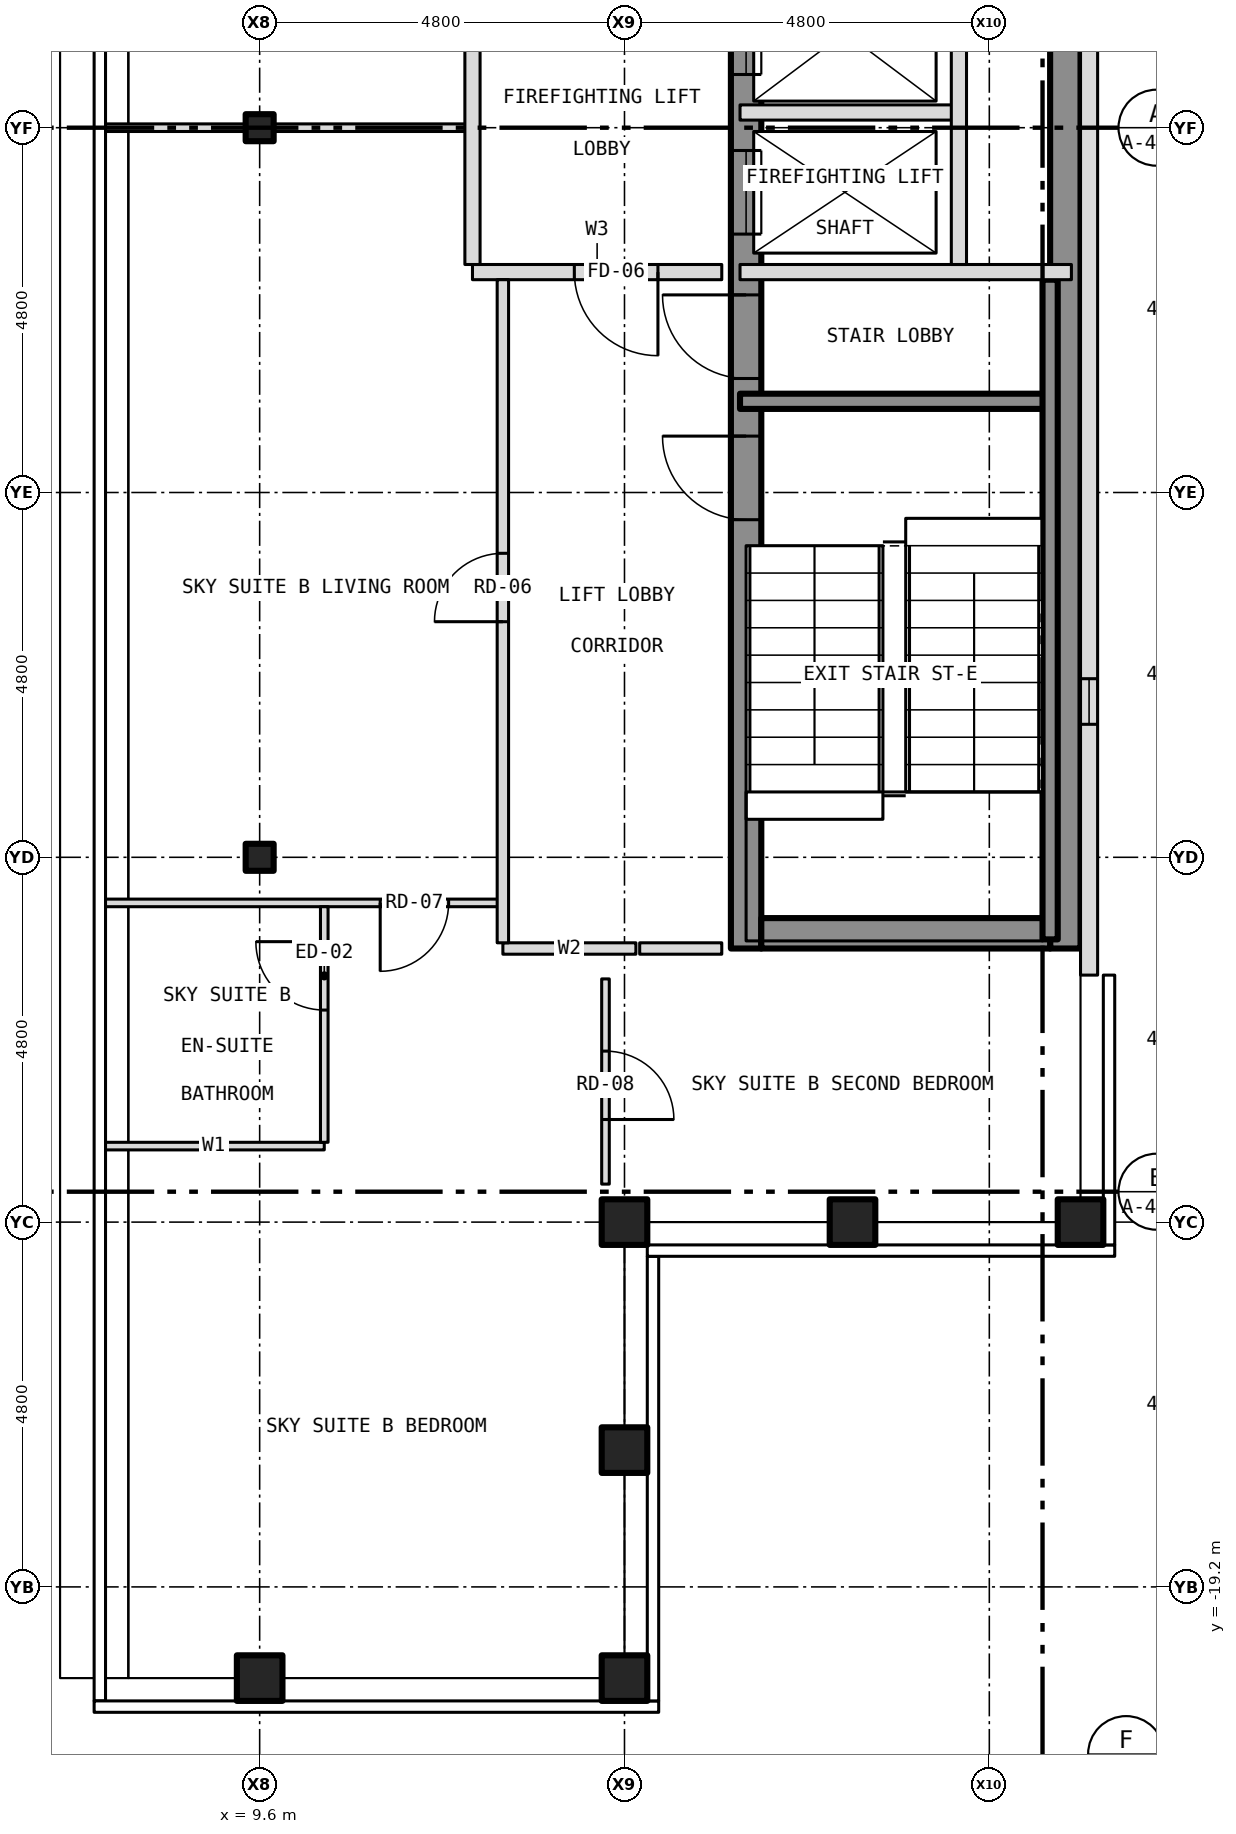
"""IFC4 building model, lengths in metres.
Left out: names, types, materials, properties, quantities, classifications, styles, units other than length and angle.
Written with IfcOpenShell. Run it as: python <this file> out.ifc"""

import sys

from ifc_helpers import new_model, si_unit, direction, frame, frame_2d, origin, origin_2d, place, context, subcontext, project, spatial, rectangle, hollow_rectangle, i_section, extrude, element, fill, save


model = new_model("IFC4")
c1 = context("Model", 3, precision=1e-05, world=origin(), true_north=direction((0.0, 1.0)))
c2 = subcontext(c1, "Body", "Model", "MODEL_VIEW")
j1 = project(units=[si_unit("LENGTHUNIT", "METRE"), si_unit("PLANEANGLEUNIT", "RADIAN")], contexts=[c1])
p1 = place(None, origin())
s1 = spatial("IfcSite", under=j1, at=p1, CompositionType="ELEMENT")
p2 = place(p1, origin())
s2 = spatial("IfcBuilding", under=s1, at=p2, CompositionType="ELEMENT")
p3 = place(p2, frame((0.0, 0.0, 269.0)))
s3 = spatial("IfcBuildingStorey", under=s2, at=p3, CompositionType="ELEMENT", Elevation=269.0)
for number, where, z_axis, x_axis in (
    (1, (9.6, -20.4, -0.15), (0.0, 0.0, 1.0), (1.0, 0.0, 0.0)),
    (2, (14.4, -20.4, -0.15), (0.0, 0.0, 1.0), (1.0, 0.0, 0.0)),
    (3, (20.4, -14.4, -0.15), (0.0, 0.0, 1.0), (1.0, 0.0, 0.0)),
    (4, (14.4, -14.4, -0.15), (0.0, 0.0, 1.0), (1.0, 0.0, 0.0)),
    (5, (14.4, -17.4, -0.15), (0.0, 0.0, 1.0), (1.0, 0.0, 0.0)),
    (6, (17.4, -14.4, -0.15), (0.0, 0.0, 1.0), (1.0, 0.0, 0.0)),
):
    element("IfcColumn", number, at=place(p3, frame(where, z_axis=z_axis, x_axis=x_axis)), inside=s3, PredefinedType="COLUMN", context=c2, shape_type="SweptSolid", body=[
        extrude(hollow_rectangle(XDim=0.6, YDim=0.6, WallThickness=0.03, at=origin_2d()), origin(), (0.0, 0.0, 1.0), 3.5),
    ])
for number, where, z_axis, x_axis in (
    (7, (9.6, -9.6, -0.15), (0.0, 0.0, 1.0), (1.0, 0.0, 0.0)),
    (8, (9.6, 0.0, -0.15), (0.0, 0.0, 1.0), (1.0, 0.0, 0.0)),
):
    element("IfcColumn", number, at=place(p3, frame(where, z_axis=z_axis, x_axis=x_axis)), inside=s3, PredefinedType="COLUMN", context=c2, shape_type="SweptSolid", body=[
        extrude(i_section(OverallWidth=0.368, OverallDepth=0.356, WebThickness=0.011, FlangeThickness=0.018, at=origin_2d()), origin(), (0.0, 0.0, 1.0), 3.5),
    ])
p4 = place(p3, frame((16.0, -10.8, 0.0), z_axis=(0.0, 0.0, 1.0), x_axis=(0.0, 1.0, 0.0)))
e9 = element("IfcWall", 9, at=p4, inside=s3, PredefinedType="SHEAR", context=c2, shape_type="SweptSolid", body=[
    extrude(rectangle(XDim=21.6, YDim=0.4, at=frame_2d((10.8, 0.0))), origin(), (0.0, 0.0, 1.0), 3.25),
])
p5 = place(p4, frame((9.4, 0.0, 0.0)))
e10 = element("IfcOpeningElement", 10, at=p5, cuts=e9, PredefinedType="OPENING", context=c2, shape_type="SweptSolid", body=[
    extrude(rectangle(XDim=1.1, YDim=2.1, at=frame_2d((0.55, 1.05))), frame((0.0, 0.212, 0.0), z_axis=(0.0, -1.0, 0.0), x_axis=(1.0, 0.0, 0.0)), (0.0, 0.0, 1.0), 0.424),
])
p6 = place(p4, frame((11.5, 0.0, 0.0)))
e11 = element("IfcOpeningElement", 11, at=p6, cuts=e9, PredefinedType="OPENING", context=c2, shape_type="SweptSolid", body=[
    extrude(rectangle(XDim=1.1, YDim=2.1, at=frame_2d((0.55, 1.05))), frame((0.0, 0.212, 0.0), z_axis=(0.0, -1.0, 0.0), x_axis=(1.0, 0.0, 0.0)), (0.0, 0.0, 1.0), 0.424),
])
p7 = place(p4, frame((13.6, 0.0, 0.0)))
e12 = element("IfcOpeningElement", 12, at=p7, cuts=e9, PredefinedType="OPENING", context=c2, shape_type="SweptSolid", body=[
    extrude(rectangle(XDim=1.1, YDim=2.1, at=frame_2d((0.55, 1.05))), frame((0.0, 0.212, 0.0), z_axis=(0.0, -1.0, 0.0), x_axis=(1.0, 0.0, 0.0)), (0.0, 0.0, 1.0), 0.424),
])
p8 = place(p4, frame((15.7, 0.0, 0.0)))
e13 = element("IfcOpeningElement", 13, at=p8, cuts=e9, PredefinedType="OPENING", context=c2, shape_type="SweptSolid", body=[
    extrude(rectangle(XDim=1.1, YDim=2.1, at=frame_2d((0.55, 1.05))), frame((0.0, 0.212, 0.0), z_axis=(0.0, -1.0, 0.0), x_axis=(1.0, 0.0, 0.0)), (0.0, 0.0, 1.0), 0.424),
])
p9 = place(p4, frame((17.8, 0.0, 0.0)))
e14 = element("IfcOpeningElement", 14, at=p9, cuts=e9, PredefinedType="OPENING", context=c2, shape_type="SweptSolid", body=[
    extrude(rectangle(XDim=1.1, YDim=2.1, at=frame_2d((0.55, 1.05))), frame((0.0, 0.212, 0.0), z_axis=(0.0, -1.0, 0.0), x_axis=(1.0, 0.0, 0.0)), (0.0, 0.0, 1.0), 0.424),
])
p10 = place(p4, frame((5.642, 0.0, 0.0)))
e15 = element("IfcOpeningElement", 15, at=p10, cuts=e9, PredefinedType="OPENING", context=c2, shape_type="SweptSolid", body=[
    extrude(rectangle(XDim=1.1, YDim=2.1, at=frame_2d((0.55, 1.05))), frame((0.0, 0.212, 0.0), z_axis=(0.0, -1.0, 0.0), x_axis=(1.0, 0.0, 0.0)), (0.0, 0.0, 1.0), 0.424),
])
p11 = place(p4, frame((7.5, 0.0, 0.0)))
e16 = element("IfcOpeningElement", 16, at=p11, cuts=e9, PredefinedType="OPENING", context=c2, shape_type="SweptSolid", body=[
    extrude(rectangle(XDim=1.1, YDim=2.1, at=frame_2d((0.55, 1.05))), frame((0.0, 0.212, 0.0), z_axis=(0.0, -1.0, 0.0), x_axis=(1.0, 0.0, 0.0)), (0.0, 0.0, 1.0), 0.424),
])
p12 = place(p4, frame((20.0, 0.0, 0.0)))
e17 = element("IfcOpeningElement", 17, at=p12, cuts=e9, PredefinedType="OPENING", context=c2, shape_type="SweptSolid", body=[
    extrude(rectangle(XDim=0.9, YDim=2.1, at=frame_2d((0.45, 1.05))), frame((0.0, 0.212, 0.0), z_axis=(0.0, -1.0, 0.0), x_axis=(1.0, 0.0, 0.0)), (0.0, 0.0, 1.0), 0.424),
])
p13 = place(p3, frame((20.2, -10.8, 0.0), z_axis=(0.0, 0.0, 1.0), x_axis=(0.0, 1.0, 0.0)))
e18 = element("IfcWall", 18, at=p13, inside=s3, PredefinedType="SHEAR", context=c2, shape_type="SweptSolid", body=[
    extrude(rectangle(XDim=21.6, YDim=0.4, at=frame_2d((10.8, 0.0))), origin(), (0.0, 0.0, 1.0), 3.25),
])
p14 = place(p3, frame((16.2, -10.6, 0.0), z_axis=(0.0, 0.0, 1.0), x_axis=(1.0, 0.0, 0.0)))
e19 = element("IfcWall", 19, at=p14, inside=s3, PredefinedType="SHEAR", context=c2, shape_type="SweptSolid", body=[
    extrude(rectangle(XDim=3.8, YDim=0.4, at=frame_2d((1.9, 0.0))), origin(), (0.0, 0.0, 1.0), 3.25),
])
p15 = place(p3, frame((20.512, -11.15, 0.0), z_axis=(0.0, 0.0, 1.0), x_axis=(0.0, 1.0, 0.0)))
e20 = element("IfcWall", 20, at=p15, inside=s3, PredefinedType="SOLIDWALL", context=c2, shape_type="SweptSolid", body=[
    extrude(rectangle(XDim=22.3, YDim=0.225, at=frame_2d((11.15, 0.0))), origin(), (0.0, 0.0, 1.0), 3.5),
])
p16 = place(p15, frame((3.3, 0.0, 1.0)))
e21 = element("IfcOpeningElement", 21, at=p16, cuts=e20, PredefinedType="OPENING", context=c2, shape_type="SweptSolid", body=[
    extrude(rectangle(XDim=0.6, YDim=1.5, at=frame_2d((0.3, 0.75))), frame((0.0, 0.125, 0.0), z_axis=(0.0, -1.0, 0.0), x_axis=(1.0, 0.0, 0.0)), (0.0, 0.0, 1.0), 0.249),
])
p17 = place(p3, frame((7.542, -13.4, 0.0), z_axis=(0.0, 0.0, 1.0), x_axis=(1.0, 0.0, 0.0)))
e22 = element("IfcWall", 22, at=p17, inside=s3, PredefinedType="PARTITIONING", context=c2, shape_type="SweptSolid", body=[
    extrude(rectangle(XDim=2.908, YDim=0.1, at=frame_2d((1.454, 0.0))), origin(), (0.0, 0.0, 1.0), 3.35),
])
p18 = place(p3, frame((12.8, -10.8, 0.0), z_axis=(0.0, 0.0, 1.0), x_axis=(1.0, 0.0, 0.0)))
e23 = element("IfcWall", 23, at=p18, inside=s3, PredefinedType="PARTITIONING", context=c2, shape_type="SweptSolid", body=[
    extrude(rectangle(XDim=1.75, YDim=0.15, at=frame_2d((0.875, 0.0))), origin(), (0.0, 0.0, 1.0), 3.35),
])
p19 = place(p3, frame((14.6, -10.8, 0.0), z_axis=(0.0, 0.0, 1.0), x_axis=(1.0, 0.0, 0.0)))
e24 = element("IfcWall", 24, at=p19, inside=s3, PredefinedType="PARTITIONING", context=c2, shape_type="SweptSolid", body=[
    extrude(rectangle(XDim=1.08, YDim=0.15, at=frame_2d((0.54, 0.0))), origin(), (0.0, 0.0, 1.0), 3.35),
])
p20 = place(p3, frame((7.542, -10.2, 0.0), z_axis=(0.0, 0.0, 1.0), x_axis=(1.0, 0.0, 0.0)))
e25 = element("IfcWall", 25, at=p20, inside=s3, PredefinedType="PARTITIONING", context=c2, shape_type="SweptSolid", body=[
    extrude(rectangle(XDim=5.258, YDim=0.1, at=frame_2d((2.629, 0.0))), origin(), (0.0, 0.0, 1.0), 3.35),
])
p21 = place(p20, frame((3.644, 0.0, 0.0)))
e26 = element("IfcOpeningElement", 26, at=p21, cuts=e25, PredefinedType="OPENING", context=c2, shape_type="SweptSolid", body=[
    extrude(rectangle(XDim=0.9, YDim=2.1, at=frame_2d((0.45, 1.05))), frame((0.0, 0.062, 0.0), z_axis=(0.0, -1.0, 0.0), x_axis=(1.0, 0.0, 0.0)), (0.0, 0.0, 1.0), 0.124),
])
p22 = place(p3, frame((15.92, -3.6, 0.0), z_axis=(0.0, 0.0, 1.0), x_axis=(1.0, 0.0, 0.0)))
e27 = element("IfcWall", 27, at=p22, inside=s3, PredefinedType="SHEAR", context=c2, shape_type="SweptSolid", body=[
    extrude(rectangle(XDim=4.08, YDim=0.2, at=frame_2d((2.04, 0.0))), origin(), (0.0, 0.0, 1.0), 3.25),
])
p23 = place(p3, frame((12.4, -1.9, 0.0), z_axis=(0.0, 0.0, 1.0), x_axis=(1.0, 0.0, 0.0)))
e28 = element("IfcWall", 28, at=p23, inside=s3, PredefinedType="PARTITIONING", context=c2, shape_type="SweptSolid", body=[
    extrude(rectangle(XDim=3.28, YDim=0.2, at=frame_2d((1.64, 0.0))), origin(), (0.0, 0.0, 1.0), 3.35),
])
p24 = place(p23, frame((1.34, 0.0, 0.0)))
e29 = element("IfcOpeningElement", 29, at=p24, cuts=e28, PredefinedType="OPENING", context=c2, shape_type="SweptSolid", body=[
    extrude(rectangle(XDim=1.1, YDim=2.1, at=frame_2d((0.55, 1.05))), frame((0.0, 0.112, 0.0), z_axis=(0.0, -1.0, 0.0), x_axis=(1.0, 0.0, 0.0)), (0.0, 0.0, 1.0), 0.224),
])
p25 = place(p3, frame((15.92, -1.9, 0.0), z_axis=(0.0, 0.0, 1.0), x_axis=(1.0, 0.0, 0.0)))
e30 = element("IfcWall", 30, at=p25, inside=s3, PredefinedType="PARTITIONING", context=c2, shape_type="SweptSolid", body=[
    extrude(rectangle(XDim=4.36, YDim=0.2, at=frame_2d((2.18, 0.0))), origin(), (0.0, 0.0, 1.0), 3.25),
])
p26 = place(p3, frame((7.542, 0.0, 0.0), z_axis=(0.0, 0.0, 1.0), x_axis=(1.0, 0.0, 0.0)))
e31 = element("IfcWall", 31, at=p26, inside=s3, PredefinedType="PARTITIONING", context=c2, shape_type="SweptSolid", body=[
    extrude(rectangle(XDim=1.874, YDim=0.1, at=frame_2d((0.937, 0.0))), origin(), (0.0, 0.0, 1.0), 2.728),
])
p27 = place(p3, frame((9.416, 0.0, 0.0), z_axis=(0.0, 0.0, 1.0), x_axis=(1.0, 0.0, 0.0)))
e32 = element("IfcWall", 32, at=p27, inside=s3, PredefinedType="PARTITIONING", context=c2, shape_type="SweptSolid", body=[
    extrude(rectangle(XDim=0.368, YDim=0.1, at=frame_2d((0.184, 0.0))), origin(), (0.0, 0.0, 1.0), 3.35),
])
p28 = place(p3, frame((9.784, 0.0, 0.0), z_axis=(0.0, 0.0, 1.0), x_axis=(1.0, 0.0, 0.0)))
e33 = element("IfcWall", 33, at=p28, inside=s3, PredefinedType="PARTITIONING", context=c2, shape_type="SweptSolid", body=[
    extrude(rectangle(XDim=2.616, YDim=0.1, at=frame_2d((1.308, 0.0))), origin(), (0.0, 0.0, 1.0), 2.728),
])
p29 = place(p3, frame((15.92, 0.2, 0.0), z_axis=(0.0, 0.0, 1.0), x_axis=(1.0, 0.0, 0.0)))
e34 = element("IfcWall", 34, at=p29, inside=s3, PredefinedType="PARTITIONING", context=c2, shape_type="SweptSolid", body=[
    extrude(rectangle(XDim=2.88, YDim=0.2, at=frame_2d((1.44, 0.0))), origin(), (0.0, 0.0, 1.0), 3.25),
])
p30 = place(p3, frame((10.45, -13.35, 0.0), z_axis=(0.0, 0.0, 1.0), x_axis=(0.0, 1.0, 0.0)))
e35 = element("IfcWall", 35, at=p30, inside=s3, PredefinedType="PARTITIONING", context=c2, shape_type="SweptSolid", body=[
    extrude(rectangle(XDim=3.1, YDim=0.1, at=frame_2d((1.55, 0.0))), origin(), (0.0, 0.0, 1.0), 3.35),
])
p31 = place(p30, frame((1.74, 0.0, 0.0)))
e36 = element("IfcOpeningElement", 36, at=p31, cuts=e35, PredefinedType="OPENING", context=c2, shape_type="SweptSolid", body=[
    extrude(rectangle(XDim=0.9, YDim=2.1, at=frame_2d((0.45, 1.05))), frame((0.0, 0.062, 0.0), z_axis=(0.0, -1.0, 0.0), x_axis=(1.0, 0.0, 0.0)), (0.0, 0.0, 1.0), 0.124),
])
p32 = place(p3, frame((12.4, -1.8, 0.0), z_axis=(0.0, 0.0, 1.0), x_axis=(0.0, 1.0, 0.0)))
e37 = element("IfcWall", 37, at=p32, inside=s3, PredefinedType="PARTITIONING", context=c2, shape_type="SweptSolid", body=[
    extrude(rectangle(XDim=4.0, YDim=0.2, at=frame_2d((2.0, 0.0))), origin(), (0.0, 0.0, 1.0), 3.35),
])
p33 = place(p3, frame((12.8, -10.725, 0.0), z_axis=(0.0, 0.0, 1.0), x_axis=(0.0, 1.0, 0.0)))
e38 = element("IfcWall", 38, at=p33, inside=s3, PredefinedType="PARTITIONING", context=c2, shape_type="SweptSolid", body=[
    extrude(rectangle(XDim=8.725, YDim=0.15, at=frame_2d((4.363, 0.0))), origin(), (0.0, 0.0, 1.0), 3.35),
])
p34 = place(p33, frame((4.225, 0.0, 0.0)))
e39 = element("IfcOpeningElement", 39, at=p34, cuts=e38, PredefinedType="OPENING", context=c2, shape_type="SweptSolid", body=[
    extrude(rectangle(XDim=0.9, YDim=2.1, at=frame_2d((0.45, 1.05))), frame((0.0, 0.087, 0.0), z_axis=(0.0, -1.0, 0.0), x_axis=(1.0, 0.0, 0.0)), (0.0, 0.0, 1.0), 0.174),
])
p35 = place(p3, frame((14.15, -13.9, 0.0), z_axis=(0.0, 0.0, 1.0), x_axis=(0.0, 1.0, 0.0)))
e40 = element("IfcWall", 40, at=p35, inside=s3, PredefinedType="PARTITIONING", context=c2, shape_type="SweptSolid", body=[
    extrude(rectangle(XDim=2.7, YDim=0.1, at=frame_2d((1.35, 0.0))), origin(), (0.0, 0.0, 1.0), 3.35),
])
p36 = place(p35, frame((0.85, 0.0, 0.0)))
e41 = element("IfcOpeningElement", 41, at=p36, cuts=e40, PredefinedType="OPENING", context=c2, shape_type="SweptSolid", body=[
    extrude(rectangle(XDim=0.9, YDim=2.1, at=frame_2d((0.45, 1.05))), frame((0.0, 0.062, 0.0), z_axis=(0.0, -1.0, 0.0), x_axis=(1.0, 0.0, 0.0)), (0.0, 0.0, 1.0), 0.124),
])
p37 = place(p3, frame((18.8, -1.8, 0.0), z_axis=(0.0, 0.0, 1.0), x_axis=(0.0, 1.0, 0.0)))
e42 = element("IfcWall", 42, at=p37, inside=s3, PredefinedType="PARTITIONING", context=c2, shape_type="SweptSolid", body=[
    extrude(rectangle(XDim=8.2, YDim=0.2, at=frame_2d((4.1, 0.0))), origin(), (0.0, 0.0, 1.0), 3.25),
])
p38 = place(p3, frame((20.0, -10.68, 0.0), z_axis=(0.0, 0.0, 1.0), x_axis=(0.0, 1.0, 0.0)))
e43 = element("IfcWall", 43, at=p38, inside=s3, PredefinedType="SHEAR", context=c2, shape_type="SweptSolid", body=[
    extrude(rectangle(XDim=8.68, YDim=0.2, at=frame_2d((4.34, 0.0))), origin(), (0.0, 0.0, 1.0), 3.25),
])
p39 = place(p16, origin())
e44 = element("IfcWindow", 44, at=p39, inside=s3, PartitioningType="SINGLE_PANEL", PredefinedType="WINDOW", context=c2, shape_type="SweptSolid", body=[
    extrude(rectangle(XDim=0.6, YDim=1.5, at=frame_2d((0.3, 0.75))), frame((0.0, -0.022, 0.0), z_axis=(0.0, -1.0, 0.0), x_axis=(1.0, 0.0, 0.0)), (0.0, 0.0, 1.0), 0.06),
])
fill(e21, e44)
p40 = place(p5, origin())
e45 = element("IfcDoor", 45, at=p40, inside=s3, OperationType="SLIDING_TO_LEFT", PredefinedType="DOOR", context=c2, shape_type="SweptSolid", body=[
    extrude(rectangle(XDim=1.1, YDim=2.1, at=frame_2d((0.55, 1.05))), frame((0.0, 0.025, 0.0), z_axis=(0.0, -1.0, 0.0), x_axis=(1.0, 0.0, 0.0)), (0.0, 0.0, 1.0), 0.05),
])
fill(e10, e45)
p41 = place(p6, origin())
e46 = element("IfcDoor", 46, at=p41, inside=s3, OperationType="SLIDING_TO_LEFT", PredefinedType="DOOR", context=c2, shape_type="SweptSolid", body=[
    extrude(rectangle(XDim=1.1, YDim=2.1, at=frame_2d((0.55, 1.05))), frame((0.0, 0.025, 0.0), z_axis=(0.0, -1.0, 0.0), x_axis=(1.0, 0.0, 0.0)), (0.0, 0.0, 1.0), 0.05),
])
fill(e11, e46)
p42 = place(p10, origin())
e47 = element("IfcDoor", 47, at=p42, inside=s3, OperationType="SINGLE_SWING_RIGHT", PredefinedType="DOOR", context=c2, shape_type="SweptSolid", body=[
    extrude(rectangle(XDim=1.1, YDim=2.1, at=frame_2d((0.55, 1.05))), frame((0.0, 0.025, 0.0), z_axis=(0.0, -1.0, 0.0), x_axis=(1.0, 0.0, 0.0)), (0.0, 0.0, 1.0), 0.05),
])
fill(e15, e47)
p43 = place(p11, origin())
e48 = element("IfcDoor", 48, at=p43, inside=s3, OperationType="SINGLE_SWING_RIGHT", PredefinedType="DOOR", context=c2, shape_type="SweptSolid", body=[
    extrude(rectangle(XDim=1.1, YDim=2.1, at=frame_2d((0.55, 1.05))), frame((0.0, 0.025, 0.0), z_axis=(0.0, -1.0, 0.0), x_axis=(1.0, 0.0, 0.0)), (0.0, 0.0, 1.0), 0.05),
])
fill(e16, e48)
p44 = place(p24, origin())
e49 = element("IfcDoor", 49, at=p44, inside=s3, OperationType="SINGLE_SWING_RIGHT", PredefinedType="DOOR", context=c2, shape_type="SweptSolid", body=[
    extrude(rectangle(XDim=1.1, YDim=2.1, at=frame_2d((0.55, 1.05))), frame((0.0, 0.025, 0.0), z_axis=(0.0, -1.0, 0.0), x_axis=(1.0, 0.0, 0.0)), (0.0, 0.0, 1.0), 0.05),
])
fill(e29, e49)
p45 = place(p34, origin())
e50 = element("IfcDoor", 50, at=p45, inside=s3, OperationType="SINGLE_SWING_LEFT", PredefinedType="DOOR", context=c2, shape_type="SweptSolid", body=[
    extrude(rectangle(XDim=0.9, YDim=2.1, at=frame_2d((0.45, 1.05))), frame((0.0, 0.025, 0.0), z_axis=(0.0, -1.0, 0.0), x_axis=(1.0, 0.0, 0.0)), (0.0, 0.0, 1.0), 0.05),
])
fill(e39, e50)
p46 = place(p21, origin())
e51 = element("IfcDoor", 51, at=p46, inside=s3, OperationType="SINGLE_SWING_LEFT", PredefinedType="DOOR", context=c2, shape_type="SweptSolid", body=[
    extrude(rectangle(XDim=0.9, YDim=2.1, at=frame_2d((0.45, 1.05))), frame((0.0, 0.025, 0.0), z_axis=(0.0, -1.0, 0.0), x_axis=(1.0, 0.0, 0.0)), (0.0, 0.0, 1.0), 0.05),
])
fill(e26, e51)
p47 = place(p31, origin())
e52 = element("IfcDoor", 52, at=p47, inside=s3, OperationType="SINGLE_SWING_RIGHT", PredefinedType="DOOR", context=c2, shape_type="SweptSolid", body=[
    extrude(rectangle(XDim=0.9, YDim=2.1, at=frame_2d((0.45, 1.05))), frame((0.0, 0.025, 0.0), z_axis=(0.0, -1.0, 0.0), x_axis=(1.0, 0.0, 0.0)), (0.0, 0.0, 1.0), 0.05),
])
fill(e36, e52)
p48 = place(p36, origin())
e53 = element("IfcDoor", 53, at=p48, inside=s3, OperationType="SINGLE_SWING_LEFT", PredefinedType="DOOR", context=c2, shape_type="SweptSolid", body=[
    extrude(rectangle(XDim=0.9, YDim=2.1, at=frame_2d((0.45, 1.05))), frame((0.0, 0.025, 0.0), z_axis=(0.0, -1.0, 0.0), x_axis=(1.0, 0.0, 0.0)), (0.0, 0.0, 1.0), 0.05),
])
fill(e41, e53)
save(model, sys.argv[1])
